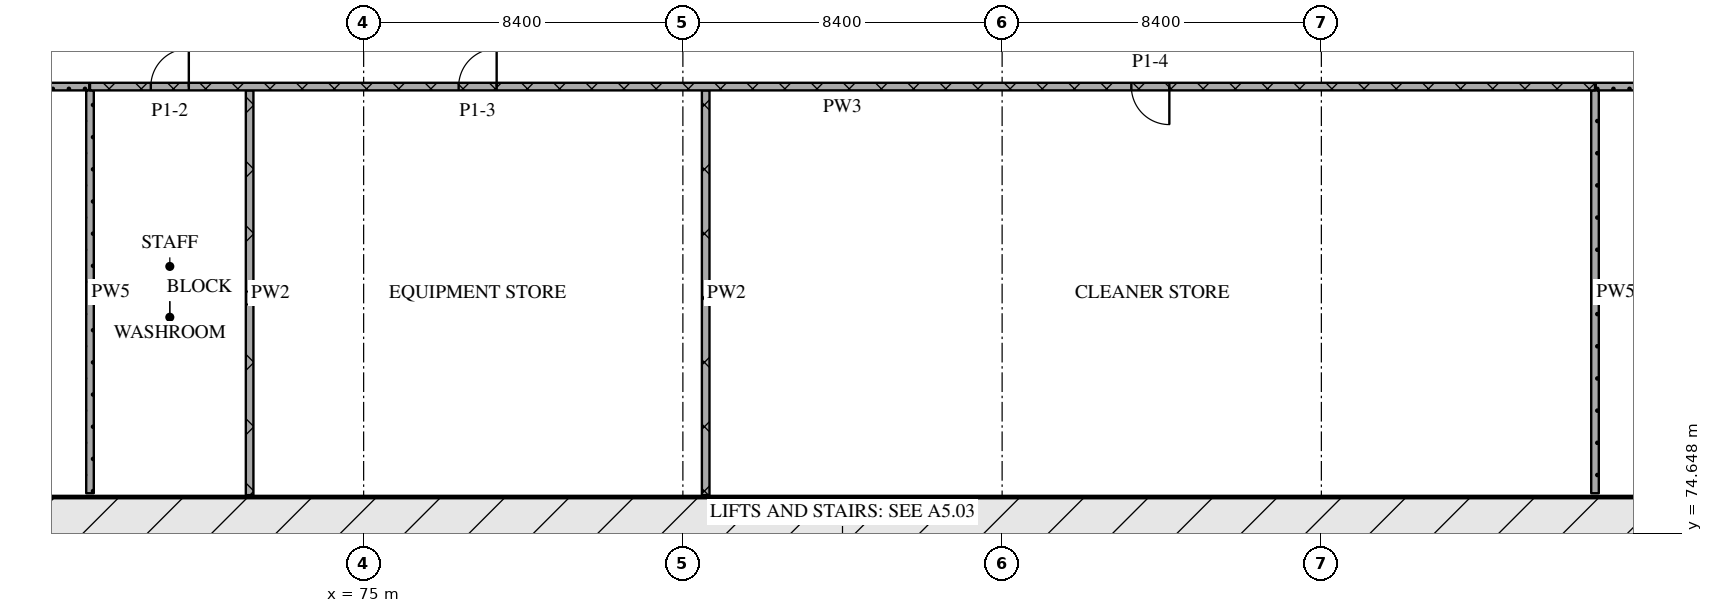
"""IFC4 building model, lengths in metres.
Left out: names, types, materials, properties, quantities, classifications, styles, units other than length and angle.
Written with IfcOpenShell. Run it as: python <this file> out.ifc"""

import sys

from ifc_helpers import new_model, si_unit, direction, frame, frame_2d, origin, place, context, subcontext, project, spatial, rectangle, extrude, element, fill, save


model = new_model("IFC4")
c1 = context("Model", 3, precision=1e-05, world=origin(), true_north=direction((0.0, 1.0)))
c2 = subcontext(c1, "Body", "Model", "MODEL_VIEW")
j1 = project(units=[si_unit("LENGTHUNIT", "METRE"), si_unit("PLANEANGLEUNIT", "RADIAN")], contexts=[c1])
p1 = place(None, origin())
s1 = spatial("IfcSite", under=j1, at=p1, CompositionType="ELEMENT")
p2 = place(p1, origin())
s2 = spatial("IfcBuilding", under=s1, at=p2, CompositionType="ELEMENT")
p3 = place(p2, frame((0.0, 0.0, 9.0)))
s3 = spatial("IfcBuildingStorey", under=s2, at=p3, CompositionType="ELEMENT", Elevation=9.0)
p4 = place(p3, frame((66.6, 75.0, 0.0), z_axis=(0.0, 0.0, 1.0), x_axis=(1.0, 0.0, 0.0)))
e1 = element("IfcWall", 1, at=p4, inside=s3, PredefinedType="SOLIDWALL", context=c2, shape_type="SweptSolid", body=[
    extrude(rectangle(XDim=42.0, YDim=1.2, at=frame_2d((21.0, 0.0))), origin(), (0.0, 0.0, 1.0), 5.1),
])
p5 = place(p3, frame((107.4, 86.4, 0.0), z_axis=(0.0, 0.0, 1.0), x_axis=(-1.0, 0.0, 0.0)))
e2 = element("IfcWall", 2, at=p5, inside=s3, PredefinedType="PARTITIONING", context=c2, shape_type="SweptSolid", body=[
    extrude(rectangle(XDim=39.6, YDim=0.2, at=frame_2d((19.8, 0.0))), origin(), (0.0, 0.0, 1.0), 5.1),
])
p6 = place(p5, frame((11.2, 0.0, 0.0)))
e3 = element("IfcOpeningElement", 3, at=p6, cuts=e2, PredefinedType="OPENING", context=c2, shape_type="SweptSolid", body=[
    extrude(rectangle(XDim=1.0, YDim=2.1, at=frame_2d((0.5, 1.05))), frame((0.0, 0.11, 0.0), z_axis=(0.0, -1.0, 0.0), x_axis=(1.0, 0.0, 0.0)), (0.0, 0.0, 1.0), 0.22),
])
p7 = place(p5, frame((28.9, 0.0, 0.0)))
e4 = element("IfcOpeningElement", 4, at=p7, cuts=e2, PredefinedType="OPENING", context=c2, shape_type="SweptSolid", body=[
    extrude(rectangle(XDim=1.0, YDim=2.1, at=frame_2d((0.5, 1.05))), frame((0.0, 0.11, 0.0), z_axis=(0.0, -1.0, 0.0), x_axis=(1.0, 0.0, 0.0)), (0.0, 0.0, 1.0), 0.22),
])
p8 = place(p5, frame((37.0, 0.0, 0.0)))
e5 = element("IfcOpeningElement", 5, at=p8, cuts=e2, PredefinedType="OPENING", context=c2, shape_type="SweptSolid", body=[
    extrude(rectangle(XDim=1.0, YDim=2.1, at=frame_2d((0.5, 1.05))), frame((0.0, 0.11, 0.0), z_axis=(0.0, -1.0, 0.0), x_axis=(1.0, 0.0, 0.0)), (0.0, 0.0, 1.0), 0.22),
])
p9 = place(p3, frame((35.4, 86.4, 0.0), z_axis=(0.0, 0.0, 1.0), x_axis=(1.0, 0.0, 0.0)))
e6 = element("IfcWall", 6, at=p9, inside=s3, PredefinedType="PARTITIONING", context=c2, shape_type="SweptSolid", body=[
    extrude(rectangle(XDim=32.38, YDim=0.2, at=frame_2d((16.19, 0.0))), origin(), (0.0, 0.0, 1.0), 5.1),
])
p10 = place(p3, frame((107.42, 86.4, 0.0), z_axis=(0.0, 0.0, 1.0), x_axis=(1.0, 0.0, 0.0)))
e7 = element("IfcWall", 7, at=p10, inside=s3, PredefinedType="PARTITIONING", context=c2, shape_type="SweptSolid", body=[
    extrude(rectangle(XDim=23.83, YDim=0.2, at=frame_2d((11.915, 0.0))), origin(), (0.0, 0.0, 1.0), 5.1),
])
p11 = place(p3, frame((67.8, 86.3, 0.0), z_axis=(0.0, 0.0, 1.0), x_axis=(0.0, -1.0, 0.0)))
e8 = element("IfcWall", 8, at=p11, inside=s3, PredefinedType="PARTITIONING", context=c2, shape_type="SweptSolid", body=[
    extrude(rectangle(XDim=10.6, YDim=0.2, at=frame_2d((5.3, 0.0))), origin(), (0.0, 0.0, 1.0), 5.1),
])
for number, where, z_axis, x_axis in (
    (9, (72.0, 86.3, 0.0), (0.0, 0.0, 1.0), (0.0, -1.0, 0.0)),
    (10, (84.0, 86.3, 0.0), (0.0, 0.0, 1.0), (0.0, -1.0, 0.0)),
):
    element("IfcWall", number, at=place(p3, frame(where, z_axis=z_axis, x_axis=x_axis)), inside=s3, PredefinedType="PARTITIONING", context=c2, shape_type="SweptSolid", body=[
        extrude(rectangle(XDim=10.65, YDim=0.2, at=frame_2d((5.325, 0.0))), origin(), (0.0, 0.0, 1.0), 5.1),
    ])
p12 = place(p3, frame((107.4, 86.3, 0.0), z_axis=(0.0, 0.0, 1.0), x_axis=(0.0, -1.0, 0.0)))
e11 = element("IfcWall", 11, at=p12, inside=s3, PredefinedType="PARTITIONING", context=c2, shape_type="SweptSolid", body=[
    extrude(rectangle(XDim=10.6, YDim=0.2, at=frame_2d((5.3, 0.0))), origin(), (0.0, 0.0, 1.0), 5.1),
])
p13 = place(p6, origin())
e12 = element("IfcDoor", 12, at=p13, inside=s3, OperationType="SINGLE_SWING_LEFT", PredefinedType="DOOR", context=c2, shape_type="SweptSolid", body=[
    extrude(rectangle(XDim=1.0, YDim=2.1, at=frame_2d((0.5, 1.05))), frame((0.0, 0.025, 0.0), z_axis=(0.0, -1.0, 0.0), x_axis=(1.0, 0.0, 0.0)), (0.0, 0.0, 1.0), 0.05),
])
fill(e3, e12)
p14 = place(p7, origin())
e13 = element("IfcDoor", 13, at=p14, inside=s3, OperationType="SINGLE_SWING_RIGHT", PredefinedType="DOOR", context=c2, shape_type="SweptSolid", body=[
    extrude(rectangle(XDim=1.0, YDim=2.1, at=frame_2d((0.5, 1.05))), frame((0.0, 0.025, 0.0), z_axis=(0.0, -1.0, 0.0), x_axis=(1.0, 0.0, 0.0)), (0.0, 0.0, 1.0), 0.05),
])
fill(e4, e13)
p15 = place(p8, origin())
e14 = element("IfcDoor", 14, at=p15, inside=s3, OperationType="SINGLE_SWING_RIGHT", PredefinedType="DOOR", context=c2, shape_type="SweptSolid", body=[
    extrude(rectangle(XDim=1.0, YDim=2.1, at=frame_2d((0.5, 1.05))), frame((0.0, 0.025, 0.0), z_axis=(0.0, -1.0, 0.0), x_axis=(1.0, 0.0, 0.0)), (0.0, 0.0, 1.0), 0.05),
])
fill(e5, e14)
save(model, sys.argv[1])
